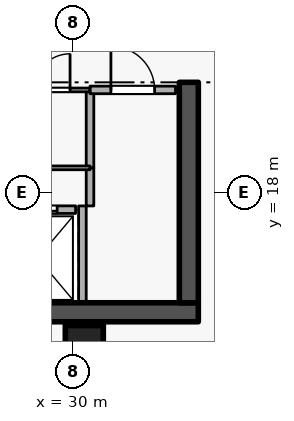
"""IFC4 building model, lengths in metres.
Left out: names, types, materials, properties, quantities, classifications, styles, units other than length and angle.
Written with IfcOpenShell. Run it as: python <this file> out.ifc"""

import sys

from ifc_helpers import new_model, si_unit, direction, frame, frame_2d, origin, origin_2d, place, context, subcontext, project, spatial, rectangle, extrude, element, fill, save


model = new_model("IFC4")
c1 = context("Model", 3, precision=1e-05, world=origin(), true_north=direction((0.0, 1.0)))
c2 = subcontext(c1, "Body", "Model", "MODEL_VIEW")
j1 = project(units=[si_unit("LENGTHUNIT", "METRE"), si_unit("PLANEANGLEUNIT", "RADIAN")], contexts=[c1])
p1 = place(None, origin())
s1 = spatial("IfcSite", under=j1, at=p1, CompositionType="ELEMENT")
p2 = place(p1, origin())
s2 = spatial("IfcBuilding", under=s1, at=p2, CompositionType="ELEMENT")
p3 = place(p2, frame((0.0, 0.0, 221.7)))
s3 = spatial("IfcBuildingStorey", under=s2, at=p3, CompositionType="ELEMENT", Elevation=221.7)
p4 = place(p3, frame((17.7, 14.85, 0.0), z_axis=(0.0, 0.0, 1.0), x_axis=(1.0, 0.0, 0.0)))
e1 = element("IfcWall", 1, at=p4, inside=s3, PredefinedType="SHEAR", context=c2, shape_type="SweptSolid", body=[
    extrude(rectangle(XDim=15.6, YDim=0.5, at=frame_2d((7.8, 0.0))), origin(), (0.0, 0.0, 1.0), 4.2),
])
p5 = place(p3, frame((33.05, 15.1, 0.0), z_axis=(0.0, 0.0, 1.0), x_axis=(0.0, 1.0, 0.0)))
e2 = element("IfcWall", 2, at=p5, inside=s3, PredefinedType="SHEAR", context=c2, shape_type="SweptSolid", body=[
    extrude(rectangle(XDim=5.8, YDim=0.5, at=frame_2d((2.9, 0.0))), origin(), (0.0, 0.0, 1.0), 4.2),
])
p6 = place(p3, frame((30.3, 14.0, 0.0), z_axis=(0.0, 0.0, 1.0), x_axis=(1.0, 0.0, 0.0)))
e3 = element("IfcColumn", 3, at=p6, inside=s3, PredefinedType="COLUMN", context=c2, shape_type="SweptSolid", body=[
    extrude(rectangle(XDim=1.0, YDim=1.0, at=origin_2d()), origin(), (0.0, 0.0, 1.0), 4.2),
])
p7 = place(p3, frame((28.08, 17.55, 0.0), z_axis=(0.0, 0.0, 1.0), x_axis=(1.0, 0.0, 0.0)))
e4 = element("IfcWall", 4, at=p7, inside=s3, PredefinedType="STANDARD", context=c2, shape_type="SweptSolid", body=[
    extrude(rectangle(XDim=1.99, YDim=0.2, at=frame_2d((0.995, 0.0))), origin(), (0.0, 0.0, 1.0), 3.94),
])
p8 = place(p7, frame((0.485, 0.0, 0.0)))
e5 = element("IfcOpeningElement", 5, at=p8, cuts=e4, PredefinedType="OPENING", context=c2, shape_type="SweptSolid", body=[
    extrude(rectangle(XDim=1.02, YDim=2.06, at=frame_2d((0.51, 1.03))), frame((0.0, 0.11, 0.0), z_axis=(0.0, -1.0, 0.0), x_axis=(1.0, 0.0, 0.0)), (0.0, 0.0, 1.0), 0.22),
])
p9 = place(p3, frame((30.25, 15.112, 0.0), z_axis=(0.0, 0.0, 1.0), x_axis=(0.0, 1.0, 0.0)))
e6 = element("IfcWall", 6, at=p9, inside=s3, PredefinedType="STANDARD", context=c2, shape_type="SweptSolid", body=[
    extrude(rectangle(XDim=2.536, YDim=0.2, at=frame_2d((1.268, 0.0))), origin(), (0.0, 0.0, 1.0), 3.94),
])
p10 = place(p3, frame((30.45, 17.648, 0.0), z_axis=(0.0, 0.0, 1.0), x_axis=(0.0, 1.0, 0.0)))
e7 = element("IfcWall", 7, at=p10, inside=s3, PredefinedType="STANDARD", context=c2, shape_type="SweptSolid", body=[
    extrude(rectangle(XDim=1.002, YDim=0.2, at=frame_2d((0.501, 0.0))), origin(), (0.0, 0.0, 1.0), 3.94),
])
p11 = place(p3, frame((30.45, 18.65, 0.0), z_axis=(0.0, 0.0, 1.0), x_axis=(0.0, 1.0, 0.0)))
e8 = element("IfcWall", 8, at=p11, inside=s3, PredefinedType="STANDARD", context=c2, shape_type="SweptSolid", body=[
    extrude(rectangle(XDim=2.05, YDim=0.2, at=frame_2d((1.025, 0.0))), origin(), (0.0, 0.0, 1.0), 3.94),
])
p12 = place(p3, frame((30.45, 20.7, 0.0), z_axis=(0.0, 0.0, 1.0), x_axis=(1.0, 0.0, 0.0)))
e9 = element("IfcWall", 9, at=p12, inside=s3, PredefinedType="STANDARD", context=c2, shape_type="SweptSolid", body=[
    extrude(rectangle(XDim=2.25, YDim=0.2, at=frame_2d((1.125, 0.0))), origin(), (0.0, 0.0, 1.0), 3.94),
])
p13 = place(p12, frame((0.55, 0.0, 0.0)))
e10 = element("IfcOpeningElement", 10, at=p13, cuts=e9, PredefinedType="OPENING", context=c2, shape_type="SweptSolid", body=[
    extrude(rectangle(XDim=1.15, YDim=2.1, at=frame_2d((0.575, 1.05))), frame((0.0, 0.11, 0.0), z_axis=(0.0, -1.0, 0.0), x_axis=(1.0, 0.0, 0.0)), (0.0, 0.0, 1.0), 0.22),
])
p14 = place(p3, frame((30.45, 18.65, 0.0), z_axis=(0.0, 0.0, 1.0), x_axis=(-1.0, 0.0, 0.0)))
e11 = element("IfcWall", 11, at=p14, inside=s3, PredefinedType="PARTITIONING", context=c2, shape_type="SweptSolid", body=[
    extrude(rectangle(XDim=2.0, YDim=0.1, at=frame_2d((1.0, 0.0))), origin(), (0.0, 0.0, 1.0), 3.94),
])
p15 = place(p3, frame((28.45, 20.7, 0.0), z_axis=(0.0, 0.0, 1.0), x_axis=(1.0, 0.0, 0.0)))
e12 = element("IfcWall", 12, at=p15, inside=s3, PredefinedType="PARTITIONING", context=c2, shape_type="SweptSolid", body=[
    extrude(rectangle(XDim=2.0, YDim=0.1, at=frame_2d((1.0, 0.0))), origin(), (0.0, 0.0, 1.0), 3.94),
])
p16 = place(p15, frame((0.525, 0.0, 0.0)))
e13 = element("IfcOpeningElement", 13, at=p16, cuts=e12, PredefinedType="OPENING", context=c2, shape_type="SweptSolid", body=[
    extrude(rectangle(XDim=0.95, YDim=2.1, at=frame_2d((0.475, 1.05))), frame((0.0, 0.06, 0.0), z_axis=(0.0, -1.0, 0.0), x_axis=(1.0, 0.0, 0.0)), (0.0, 0.0, 1.0), 0.12),
])
p17 = place(p8, origin())
e14 = element("IfcDoor", 14, at=p17, inside=s3, OperationType="SLIDING_TO_LEFT", PredefinedType="DOOR", context=c2, shape_type="SweptSolid", body=[
    extrude(rectangle(XDim=1.02, YDim=2.06, at=frame_2d((0.51, 1.03))), frame((0.0, 0.025, 0.0), z_axis=(0.0, -1.0, 0.0), x_axis=(1.0, 0.0, 0.0)), (0.0, 0.0, 1.0), 0.05),
])
fill(e5, e14)
p18 = place(p16, origin())
e15 = element("IfcDoor", 15, at=p18, inside=s3, OperationType="SINGLE_SWING_RIGHT", PredefinedType="DOOR", context=c2, shape_type="SweptSolid", body=[
    extrude(rectangle(XDim=0.95, YDim=2.1, at=frame_2d((0.475, 1.05))), frame((0.0, 0.025, 0.0), z_axis=(0.0, -1.0, 0.0), x_axis=(1.0, 0.0, 0.0)), (0.0, 0.0, 1.0), 0.05),
])
fill(e13, e15)
p19 = place(p13, origin())
e16 = element("IfcDoor", 16, at=p19, inside=s3, OperationType="SINGLE_SWING_LEFT", PredefinedType="DOOR", context=c2, shape_type="SweptSolid", body=[
    extrude(rectangle(XDim=1.15, YDim=2.1, at=frame_2d((0.575, 1.05))), frame((0.0, 0.025, 0.0), z_axis=(0.0, -1.0, 0.0), x_axis=(1.0, 0.0, 0.0)), (0.0, 0.0, 1.0), 0.05),
])
fill(e10, e16)
save(model, sys.argv[1])
